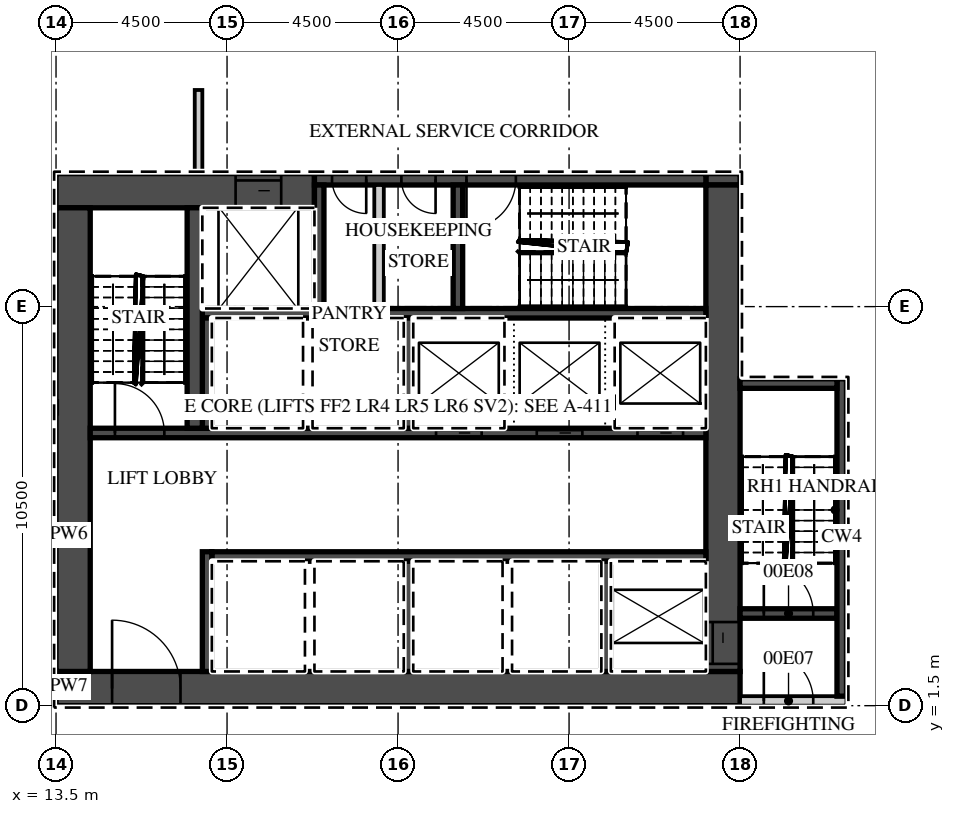
"""IFC4 building model, lengths in metres.
Left out: names, types, materials, properties, quantities, classifications, styles, units other than length and angle.
Written with IfcOpenShell. Run it as: python <this file> out.ifc"""

import sys

from ifc_helpers import new_model, si_unit, direction, frame, frame_2d, origin, place, context, subcontext, project, spatial, rectangle, extrude, element, fill, save


model = new_model("IFC4")
c1 = context("Model", 3, precision=1e-05, world=origin(), true_north=direction((0.0, 1.0)))
c2 = subcontext(c1, "Body", "Model", "MODEL_VIEW")
j1 = project(units=[si_unit("LENGTHUNIT", "METRE"), si_unit("PLANEANGLEUNIT", "RADIAN")], contexts=[c1])
p1 = place(None, origin())
s1 = spatial("IfcSite", under=j1, at=p1, CompositionType="ELEMENT")
p2 = place(p1, origin())
s2 = spatial("IfcBuilding", under=s1, at=p2, CompositionType="ELEMENT")
p3 = place(p2, origin())
s3 = spatial("IfcBuildingStorey", under=s2, at=p3, CompositionType="ELEMENT", Elevation=0.0)
p4 = place(p3, frame((13.5, 1.95, 0.0), z_axis=(0.0, 0.0, 1.0), x_axis=(1.0, 0.0, 0.0)))
e1 = element("IfcWall", 1, at=p4, inside=s3, PredefinedType="SHEAR", context=c2, shape_type="SweptSolid", body=[
    extrude(rectangle(XDim=18.0, YDim=0.9, at=frame_2d((9.0, 0.0))), origin(), (0.0, 0.0, 1.0), 10.55),
])
p5 = place(p4, frame((1.475, 0.0, 0.0)))
e2 = element("IfcOpeningElement", 2, at=p5, cuts=e1, PredefinedType="OPENING", context=c2, shape_type="SweptSolid", body=[
    extrude(rectangle(XDim=1.8, YDim=2.1, at=frame_2d((0.9, 1.05))), frame((0.0, 0.46, 0.0), z_axis=(0.0, -1.0, 0.0), x_axis=(1.0, 0.0, 0.0)), (0.0, 0.0, 1.0), 0.92),
])
p6 = place(p3, frame((13.5, 15.05, 0.0), z_axis=(0.0, 0.0, 1.0), x_axis=(1.0, 0.0, 0.0)))
e3 = element("IfcWall", 3, at=p6, inside=s3, PredefinedType="SHEAR", context=c2, shape_type="SweptSolid", body=[
    extrude(rectangle(XDim=6.8, YDim=0.9, at=frame_2d((3.4, 0.0))), origin(), (0.0, 0.0, 1.0), 10.55),
])
p7 = place(p6, frame((4.725, 0.0, 0.0)))
e4 = element("IfcOpeningElement", 4, at=p7, cuts=e3, PredefinedType="OPENING", context=c2, shape_type="SweptSolid", body=[
    extrude(rectangle(XDim=1.2, YDim=2.1, at=frame_2d((0.6, 1.05))), frame((0.0, 0.46, 0.0), z_axis=(0.0, -1.0, 0.0), x_axis=(1.0, 0.0, 0.0)), (0.0, 0.0, 1.0), 0.92),
])
p8 = place(p3, frame((30.6, 15.35, 0.0), z_axis=(0.0, 0.0, 1.0), x_axis=(1.0, 0.0, 0.0)))
e5 = element("IfcWall", 5, at=p8, inside=s3, PredefinedType="SHEAR", context=c2, shape_type="SweptSolid", body=[
    extrude(rectangle(XDim=0.9, YDim=0.3, at=frame_2d((0.45, 0.0))), origin(), (0.0, 0.0, 1.0), 10.55),
])
p9 = place(p3, frame((20.3, 15.35, 0.0), z_axis=(0.0, 0.0, 1.0), x_axis=(1.0, 0.0, 0.0)))
e6 = element("IfcWall", 6, at=p9, inside=s3, PredefinedType="SHEAR", context=c2, shape_type="SweptSolid", body=[
    extrude(rectangle(XDim=10.3, YDim=0.3, at=frame_2d((5.15, 0.0))), origin(), (0.0, 0.0, 1.0), 10.55),
])
p10 = place(p9, frame((4.0, 0.0, 0.0)))
e7 = element("IfcOpeningElement", 7, at=p10, cuts=e6, PredefinedType="OPENING", context=c2, shape_type="SweptSolid", body=[
    extrude(rectangle(XDim=1.3, YDim=2.1, at=frame_2d((0.65, 1.05))), frame((0.0, 0.16, 0.0), z_axis=(0.0, -1.0, 0.0), x_axis=(1.0, 0.0, 0.0)), (0.0, 0.0, 1.0), 0.32),
])
p11 = place(p9, frame((2.288, 0.0, 0.0)))
e8 = element("IfcOpeningElement", 8, at=p11, cuts=e6, PredefinedType="OPENING", context=c2, shape_type="SweptSolid", body=[
    extrude(rectangle(XDim=0.9, YDim=2.1, at=frame_2d((0.45, 1.05))), frame((0.0, 0.16, 0.0), z_axis=(0.0, -1.0, 0.0), x_axis=(1.0, 0.0, 0.0)), (0.0, 0.0, 1.0), 0.32),
])
p12 = place(p9, frame((0.462, 0.0, 0.0)))
e9 = element("IfcOpeningElement", 9, at=p12, cuts=e6, PredefinedType="OPENING", context=c2, shape_type="SweptSolid", body=[
    extrude(rectangle(XDim=0.9, YDim=2.1, at=frame_2d((0.45, 1.05))), frame((0.0, 0.16, 0.0), z_axis=(0.0, -1.0, 0.0), x_axis=(1.0, 0.0, 0.0)), (0.0, 0.0, 1.0), 0.32),
])
p13 = place(p3, frame((31.05, 2.4, 0.0), z_axis=(0.0, 0.0, 1.0), x_axis=(0.0, 1.0, 0.0)))
e10 = element("IfcWall", 10, at=p13, inside=s3, PredefinedType="SHEAR", context=c2, shape_type="SweptSolid", body=[
    extrude(rectangle(XDim=12.8, YDim=0.9, at=frame_2d((6.4, 0.0))), origin(), (0.0, 0.0, 1.0), 10.55),
])
p14 = place(p13, frame((0.2, 0.0, 0.0)))
e11 = element("IfcOpeningElement", 11, at=p14, cuts=e10, PredefinedType="OPENING", context=c2, shape_type="SweptSolid", body=[
    extrude(rectangle(XDim=1.1, YDim=2.1, at=frame_2d((0.55, 1.05))), frame((0.0, 0.46, 0.0), z_axis=(0.0, -1.0, 0.0), x_axis=(1.0, 0.0, 0.0)), (0.0, 0.0, 1.0), 0.92),
])
p15 = place(p3, frame((13.95, 2.4, 0.0), z_axis=(0.0, 0.0, 1.0), x_axis=(0.0, 1.0, 0.0)))
e12 = element("IfcWall", 12, at=p15, inside=s3, PredefinedType="SHEAR", context=c2, shape_type="SweptSolid", body=[
    extrude(rectangle(XDim=12.2, YDim=0.9, at=frame_2d((6.1, 0.0))), origin(), (0.0, 0.0, 1.0), 10.55),
])
p16 = place(p3, frame((17.6, 5.425, 0.0), z_axis=(0.0, 0.0, 1.0), x_axis=(1.0, 0.0, 0.0)))
e13 = element("IfcWall", 13, at=p16, inside=s3, PredefinedType="SHEAR", context=c2, shape_type="SweptSolid", body=[
    extrude(rectangle(XDim=13.0, YDim=0.25, at=frame_2d((6.5, 0.0))), origin(), (0.0, 0.0, 1.0), 10.55),
])
p17 = place(p3, frame((17.475, 2.4, 0.0), z_axis=(0.0, 0.0, 1.0), x_axis=(0.0, 1.0, 0.0)))
e14 = element("IfcWall", 14, at=p17, inside=s3, PredefinedType="SHEAR", context=c2, shape_type="SweptSolid", body=[
    extrude(rectangle(XDim=3.15, YDim=0.25, at=frame_2d((1.575, 0.0))), origin(), (0.0, 0.0, 1.0), 10.55),
])
for number, where, z_axis, x_axis in (
    (15, (27.975, 2.4, 0.0), (0.0, 0.0, 1.0), (0.0, 1.0, 0.0)),
    (16, (22.775, 2.4, 0.0), (0.0, 0.0, 1.0), (0.0, 1.0, 0.0)),
):
    element("IfcWall", number, at=place(p3, frame(where, z_axis=z_axis, x_axis=x_axis)), inside=s3, PredefinedType="SHEAR", context=c2, shape_type="SweptSolid", body=[
        extrude(rectangle(XDim=2.9, YDim=0.25, at=frame_2d((1.45, 0.0))), origin(), (0.0, 0.0, 1.0), 10.55),
    ])
p18 = place(p3, frame((14.4, 8.675, 0.0), z_axis=(0.0, 0.0, 1.0), x_axis=(1.0, 0.0, 0.0)))
e17 = element("IfcWall", 17, at=p18, inside=s3, PredefinedType="SHEAR", context=c2, shape_type="SweptSolid", body=[
    extrude(rectangle(XDim=16.2, YDim=0.25, at=frame_2d((8.1, 0.0))), origin(), (0.0, 0.0, 1.0), 10.55),
])
p19 = place(p18, frame((14.4, 0.0, 0.0)))
e18 = element("IfcOpeningElement", 18, at=p19, cuts=e17, PredefinedType="OPENING", context=c2, shape_type="SweptSolid", body=[
    extrude(rectangle(XDim=1.2, YDim=2.1, at=frame_2d((0.6, 1.05))), frame((0.0, 0.135, 0.0), z_axis=(0.0, -1.0, 0.0), x_axis=(1.0, 0.0, 0.0)), (0.0, 0.0, 1.0), 0.27),
])
p20 = place(p18, frame((11.75, 0.0, 0.0)))
e19 = element("IfcOpeningElement", 19, at=p20, cuts=e17, PredefinedType="OPENING", context=c2, shape_type="SweptSolid", body=[
    extrude(rectangle(XDim=1.2, YDim=2.1, at=frame_2d((0.6, 1.05))), frame((0.0, 0.135, 0.0), z_axis=(0.0, -1.0, 0.0), x_axis=(1.0, 0.0, 0.0)), (0.0, 0.0, 1.0), 0.27),
])
p21 = place(p18, frame((9.1, 0.0, 0.0)))
e20 = element("IfcOpeningElement", 20, at=p21, cuts=e17, PredefinedType="OPENING", context=c2, shape_type="SweptSolid", body=[
    extrude(rectangle(XDim=1.2, YDim=2.1, at=frame_2d((0.6, 1.05))), frame((0.0, 0.135, 0.0), z_axis=(0.0, -1.0, 0.0), x_axis=(1.0, 0.0, 0.0)), (0.0, 0.0, 1.0), 0.27),
])
p22 = place(p18, frame((0.65, 0.0, 0.0)))
e21 = element("IfcOpeningElement", 21, at=p22, cuts=e17, PredefinedType="OPENING", context=c2, shape_type="SweptSolid", body=[
    extrude(rectangle(XDim=1.3, YDim=2.1, at=frame_2d((0.65, 1.05))), frame((0.0, 0.135, 0.0), z_axis=(0.0, -1.0, 0.0), x_axis=(1.0, 0.0, 0.0)), (0.0, 0.0, 1.0), 0.27),
])
p23 = place(p3, frame((17.35, 11.825, 0.0), z_axis=(0.0, 0.0, 1.0), x_axis=(1.0, 0.0, 0.0)))
e22 = element("IfcWall", 22, at=p23, inside=s3, PredefinedType="SHEAR", context=c2, shape_type="SweptSolid", body=[
    extrude(rectangle(XDim=13.25, YDim=0.25, at=frame_2d((6.625, 0.0))), origin(), (0.0, 0.0, 1.0), 10.55),
])
for number, where, z_axis, x_axis in (
    (23, (17.475, 8.8, 0.0), (0.0, 0.0, 1.0), (0.0, 1.0, 0.0)),
    (24, (22.775, 8.8, 0.0), (0.0, 0.0, 1.0), (0.0, 1.0, 0.0)),
):
    element("IfcWall", number, at=place(p3, frame(where, z_axis=z_axis, x_axis=x_axis)), inside=s3, PredefinedType="SHEAR", context=c2, shape_type="SweptSolid", body=[
        extrude(rectangle(XDim=2.9, YDim=0.25, at=frame_2d((1.45, 0.0))), origin(), (0.0, 0.0, 1.0), 10.55),
    ])
p24 = place(p3, frame((17.15, 8.8, 0.0), z_axis=(0.0, 0.0, 1.0), x_axis=(0.0, 1.0, 0.0)))
e25 = element("IfcWall", 25, at=p24, inside=s3, PredefinedType="SHEAR", context=c2, shape_type="SweptSolid", body=[
    extrude(rectangle(XDim=5.8, YDim=0.4, at=frame_2d((2.9, 0.0))), origin(), (0.0, 0.0, 1.0), 10.55),
])
for number, where, z_axis, x_axis in (
    (26, (20.425, 11.95, 0.0), (0.0, 0.0, 1.0), (0.0, 1.0, 0.0)),
    (27, (24.075, 11.95, 0.0), (0.0, 0.0, 1.0), (0.0, 1.0, 0.0)),
):
    element("IfcWall", number, at=place(p3, frame(where, z_axis=z_axis, x_axis=x_axis)), inside=s3, PredefinedType="SHEAR", context=c2, shape_type="SweptSolid", body=[
        extrude(rectangle(XDim=3.25, YDim=0.25, at=frame_2d((1.625, 0.0))), origin(), (0.0, 0.0, 1.0), 10.55),
    ])
p25 = place(p3, frame((22.0, 11.95, 0.0), z_axis=(0.0, 0.0, 1.0), x_axis=(0.0, 1.0, 0.0)))
e28 = element("IfcWall", 28, at=p25, inside=s3, PredefinedType="PARTITIONING", context=c2, shape_type="SweptSolid", body=[
    extrude(rectangle(XDim=3.25, YDim=0.25, at=frame_2d((1.625, 0.0))), origin(), (0.0, 0.0, 1.0), 10.55),
])
p26 = place(p3, frame((31.5, 1.625, 0.0), z_axis=(0.0, 0.0, 1.0), x_axis=(1.0, 0.0, 0.0)))
e29 = element("IfcWall", 29, at=p26, inside=s3, PredefinedType="PARTITIONING", context=c2, shape_type="SweptSolid", body=[
    extrude(rectangle(XDim=2.8, YDim=0.25, at=frame_2d((1.4, 0.0))), origin(), (0.0, 0.0, 1.0), 10.55),
])
p27 = place(p26, frame((0.625, 0.0, 0.0)))
e30 = element("IfcOpeningElement", 30, at=p27, cuts=e29, PredefinedType="OPENING", context=c2, shape_type="SweptSolid", body=[
    extrude(rectangle(XDim=1.3, YDim=2.1, at=frame_2d((0.65, 1.05))), frame((0.0, 0.135, 0.0), z_axis=(0.0, -1.0, 0.0), x_axis=(1.0, 0.0, 0.0)), (0.0, 0.0, 1.0), 0.27),
])
p28 = place(p3, frame((31.5, 3.925, 0.0), z_axis=(0.0, 0.0, 1.0), x_axis=(1.0, 0.0, 0.0)))
e31 = element("IfcWall", 31, at=p28, inside=s3, PredefinedType="SHEAR", context=c2, shape_type="SweptSolid", body=[
    extrude(rectangle(XDim=2.55, YDim=0.25, at=frame_2d((1.275, 0.0))), origin(), (0.0, 0.0, 1.0), 10.55),
])
p29 = place(p28, frame((0.625, 0.0, 0.0)))
e32 = element("IfcOpeningElement", 32, at=p29, cuts=e31, PredefinedType="OPENING", context=c2, shape_type="SweptSolid", body=[
    extrude(rectangle(XDim=1.3, YDim=2.1, at=frame_2d((0.65, 1.05))), frame((0.0, 0.135, 0.0), z_axis=(0.0, -1.0, 0.0), x_axis=(1.0, 0.0, 0.0)), (0.0, 0.0, 1.0), 0.27),
])
p30 = place(p3, frame((34.175, 1.75, 0.0), z_axis=(0.0, 0.0, 1.0), x_axis=(0.0, 1.0, 0.0)))
e33 = element("IfcWall", 33, at=p30, inside=s3, PredefinedType="SHEAR", context=c2, shape_type="SweptSolid", body=[
    extrude(rectangle(XDim=8.35, YDim=0.25, at=frame_2d((4.175, 0.0))), origin(), (0.0, 0.0, 1.0), 10.55),
])
p31 = place(p3, frame((31.5, 9.975, 0.0), z_axis=(0.0, 0.0, 1.0), x_axis=(1.0, 0.0, 0.0)))
e34 = element("IfcWall", 34, at=p31, inside=s3, PredefinedType="SHEAR", context=c2, shape_type="SweptSolid", body=[
    extrude(rectangle(XDim=2.55, YDim=0.25, at=frame_2d((1.275, 0.0))), origin(), (0.0, 0.0, 1.0), 10.55),
])
p32 = place(p3, frame((17.25, 15.5, 0.0), z_axis=(0.0, 0.0, 1.0), x_axis=(0.0, 1.0, 0.0)))
e35 = element("IfcWall", 35, at=p32, inside=s3, PredefinedType="PARTITIONING", context=c2, shape_type="SweptSolid", body=[
    extrude(rectangle(XDim=2.2, YDim=0.2, at=frame_2d((1.1, 0.0))), origin(), (0.0, 0.0, 1.0), 10.55),
])
p33 = place(p3, frame((-13.51, 9.35, 0.0), z_axis=(0.0, 0.0, 1.0), x_axis=(1.0, 0.0, 0.0)))
e36 = element("IfcWall", 36, at=p33, inside=s3, PredefinedType="SOLIDWALL", context=c2, shape_type="SweptSolid", body=[
    extrude(rectangle(XDim=27.02, YDim=0.3, at=frame_2d((13.51, 0.0))), origin(), (0.0, 0.0, 1.0), 10.55),
])
p34 = place(p33, frame((9.61, 0.0, 0.0)))
e37 = element("IfcOpeningElement", 37, at=p34, cuts=e36, PredefinedType="OPENING", context=c2, shape_type="SweptSolid", body=[
    extrude(rectangle(XDim=1.8, YDim=2.1, at=frame_2d((0.9, 1.05))), frame((0.0, 0.16, 0.0), z_axis=(0.0, -1.0, 0.0), x_axis=(1.0, 0.0, 0.0)), (0.0, 0.0, 1.0), 0.32),
])
p35 = place(p33, frame((15.61, 0.0, 0.0)))
e38 = element("IfcOpeningElement", 38, at=p35, cuts=e36, PredefinedType="OPENING", context=c2, shape_type="SweptSolid", body=[
    extrude(rectangle(XDim=1.8, YDim=2.1, at=frame_2d((0.9, 1.05))), frame((0.0, 0.16, 0.0), z_axis=(0.0, -1.0, 0.0), x_axis=(1.0, 0.0, 0.0)), (0.0, 0.0, 1.0), 0.32),
])
p36 = place(p33, frame((23.16, 0.0, 0.0)))
e39 = element("IfcOpeningElement", 39, at=p36, cuts=e36, PredefinedType="OPENING", context=c2, shape_type="SweptSolid", body=[
    extrude(rectangle(XDim=1.3, YDim=2.1, at=frame_2d((0.65, 1.05))), frame((0.0, 0.16, 0.0), z_axis=(0.0, -1.0, 0.0), x_axis=(1.0, 0.0, 0.0)), (0.0, 0.0, 1.0), 0.32),
])
p37 = place(p33, frame((2.81, 0.0, 0.2)))
e40 = element("IfcOpeningElement", 40, at=p37, cuts=e36, PredefinedType="OPENING", context=c2, shape_type="SweptSolid", body=[
    extrude(rectangle(XDim=2.4, YDim=3.2, at=frame_2d((1.2, 1.6))), frame((0.0, 0.16, 0.0), z_axis=(0.0, -1.0, 0.0), x_axis=(1.0, 0.0, 0.0)), (0.0, 0.0, 1.0), 0.32),
])
p38 = place(p19, origin())
e41 = element("IfcDoor", 41, at=p38, inside=s3, OperationType="SLIDING_TO_LEFT", PredefinedType="DOOR", context=c2, shape_type="SweptSolid", body=[
    extrude(rectangle(XDim=1.2, YDim=2.1, at=frame_2d((0.6, 1.05))), frame((0.0, 0.025, 0.0), z_axis=(0.0, -1.0, 0.0), x_axis=(1.0, 0.0, 0.0)), (0.0, 0.0, 1.0), 0.05),
])
fill(e18, e41)
p39 = place(p20, origin())
e42 = element("IfcDoor", 42, at=p39, inside=s3, OperationType="SLIDING_TO_RIGHT", PredefinedType="DOOR", context=c2, shape_type="SweptSolid", body=[
    extrude(rectangle(XDim=1.2, YDim=2.1, at=frame_2d((0.6, 1.05))), frame((0.0, 0.025, 0.0), z_axis=(0.0, -1.0, 0.0), x_axis=(1.0, 0.0, 0.0)), (0.0, 0.0, 1.0), 0.05),
])
fill(e19, e42)
p40 = place(p21, origin())
e43 = element("IfcDoor", 43, at=p40, inside=s3, OperationType="SLIDING_TO_RIGHT", PredefinedType="DOOR", context=c2, shape_type="SweptSolid", body=[
    extrude(rectangle(XDim=1.2, YDim=2.1, at=frame_2d((0.6, 1.05))), frame((0.0, 0.025, 0.0), z_axis=(0.0, -1.0, 0.0), x_axis=(1.0, 0.0, 0.0)), (0.0, 0.0, 1.0), 0.05),
])
fill(e20, e43)
p41 = place(p7, origin())
e44 = element("IfcDoor", 44, at=p41, inside=s3, OperationType="SLIDING_TO_LEFT", PredefinedType="DOOR", context=c2, shape_type="SweptSolid", body=[
    extrude(rectangle(XDim=1.2, YDim=2.1, at=frame_2d((0.6, 1.05))), frame((0.0, 0.025, 0.0), z_axis=(0.0, -1.0, 0.0), x_axis=(1.0, 0.0, 0.0)), (0.0, 0.0, 1.0), 0.05),
])
fill(e4, e44)
p42 = place(p14, origin())
e45 = element("IfcDoor", 45, at=p42, inside=s3, OperationType="SLIDING_TO_LEFT", PredefinedType="DOOR", context=c2, shape_type="SweptSolid", body=[
    extrude(rectangle(XDim=1.1, YDim=2.1, at=frame_2d((0.55, 1.05))), frame((0.0, 0.025, 0.0), z_axis=(0.0, -1.0, 0.0), x_axis=(1.0, 0.0, 0.0)), (0.0, 0.0, 1.0), 0.05),
])
fill(e11, e45)
p43 = place(p5, origin())
e46 = element("IfcDoor", 46, at=p43, inside=s3, OperationType="DOUBLE_DOOR_DOUBLE_SWING", PredefinedType="DOOR", context=c2, shape_type="SweptSolid", body=[
    extrude(rectangle(XDim=1.8, YDim=2.1, at=frame_2d((0.9, 1.05))), frame((0.0, 0.025, 0.0), z_axis=(0.0, -1.0, 0.0), x_axis=(1.0, 0.0, 0.0)), (0.0, 0.0, 1.0), 0.05),
])
fill(e2, e46)
p44 = place(p27, origin())
e47 = element("IfcDoor", 47, at=p44, inside=s3, OperationType="SINGLE_SWING_LEFT", PredefinedType="DOOR", context=c2, shape_type="SweptSolid", body=[
    extrude(rectangle(XDim=1.3, YDim=2.1, at=frame_2d((0.65, 1.05))), frame((0.0, 0.025, 0.0), z_axis=(0.0, -1.0, 0.0), x_axis=(1.0, 0.0, 0.0)), (0.0, 0.0, 1.0), 0.05),
])
fill(e30, e47)
p45 = place(p29, origin())
e48 = element("IfcDoor", 48, at=p45, inside=s3, OperationType="SINGLE_SWING_LEFT", PredefinedType="DOOR", context=c2, shape_type="SweptSolid", body=[
    extrude(rectangle(XDim=1.3, YDim=2.1, at=frame_2d((0.65, 1.05))), frame((0.0, 0.025, 0.0), z_axis=(0.0, -1.0, 0.0), x_axis=(1.0, 0.0, 0.0)), (0.0, 0.0, 1.0), 0.05),
])
fill(e32, e48)
p46 = place(p22, origin())
e49 = element("IfcDoor", 49, at=p46, inside=s3, OperationType="SINGLE_SWING_LEFT", PredefinedType="DOOR", context=c2, shape_type="SweptSolid", body=[
    extrude(rectangle(XDim=1.3, YDim=2.1, at=frame_2d((0.65, 1.05))), frame((0.0, 0.025, 0.0), z_axis=(0.0, -1.0, 0.0), x_axis=(1.0, 0.0, 0.0)), (0.0, 0.0, 1.0), 0.05),
])
fill(e21, e49)
p47 = place(p10, origin())
e50 = element("IfcDoor", 50, at=p47, inside=s3, OperationType="SINGLE_SWING_LEFT", PredefinedType="DOOR", context=c2, shape_type="SweptSolid", body=[
    extrude(rectangle(XDim=1.3, YDim=2.1, at=frame_2d((0.65, 1.05))), frame((0.0, 0.025, 0.0), z_axis=(0.0, -1.0, 0.0), x_axis=(1.0, 0.0, 0.0)), (0.0, 0.0, 1.0), 0.05),
])
fill(e7, e50)
p48 = place(p11, origin())
e51 = element("IfcDoor", 51, at=p48, inside=s3, OperationType="SINGLE_SWING_RIGHT", PredefinedType="DOOR", context=c2, shape_type="SweptSolid", body=[
    extrude(rectangle(XDim=0.9, YDim=2.1, at=frame_2d((0.45, 1.05))), frame((0.0, 0.025, 0.0), z_axis=(0.0, -1.0, 0.0), x_axis=(1.0, 0.0, 0.0)), (0.0, 0.0, 1.0), 0.05),
])
fill(e8, e51)
p49 = place(p12, origin())
e52 = element("IfcDoor", 52, at=p49, inside=s3, OperationType="SINGLE_SWING_RIGHT", PredefinedType="DOOR", context=c2, shape_type="SweptSolid", body=[
    extrude(rectangle(XDim=0.9, YDim=2.1, at=frame_2d((0.45, 1.05))), frame((0.0, 0.025, 0.0), z_axis=(0.0, -1.0, 0.0), x_axis=(1.0, 0.0, 0.0)), (0.0, 0.0, 1.0), 0.05),
])
fill(e9, e52)
save(model, sys.argv[1])
